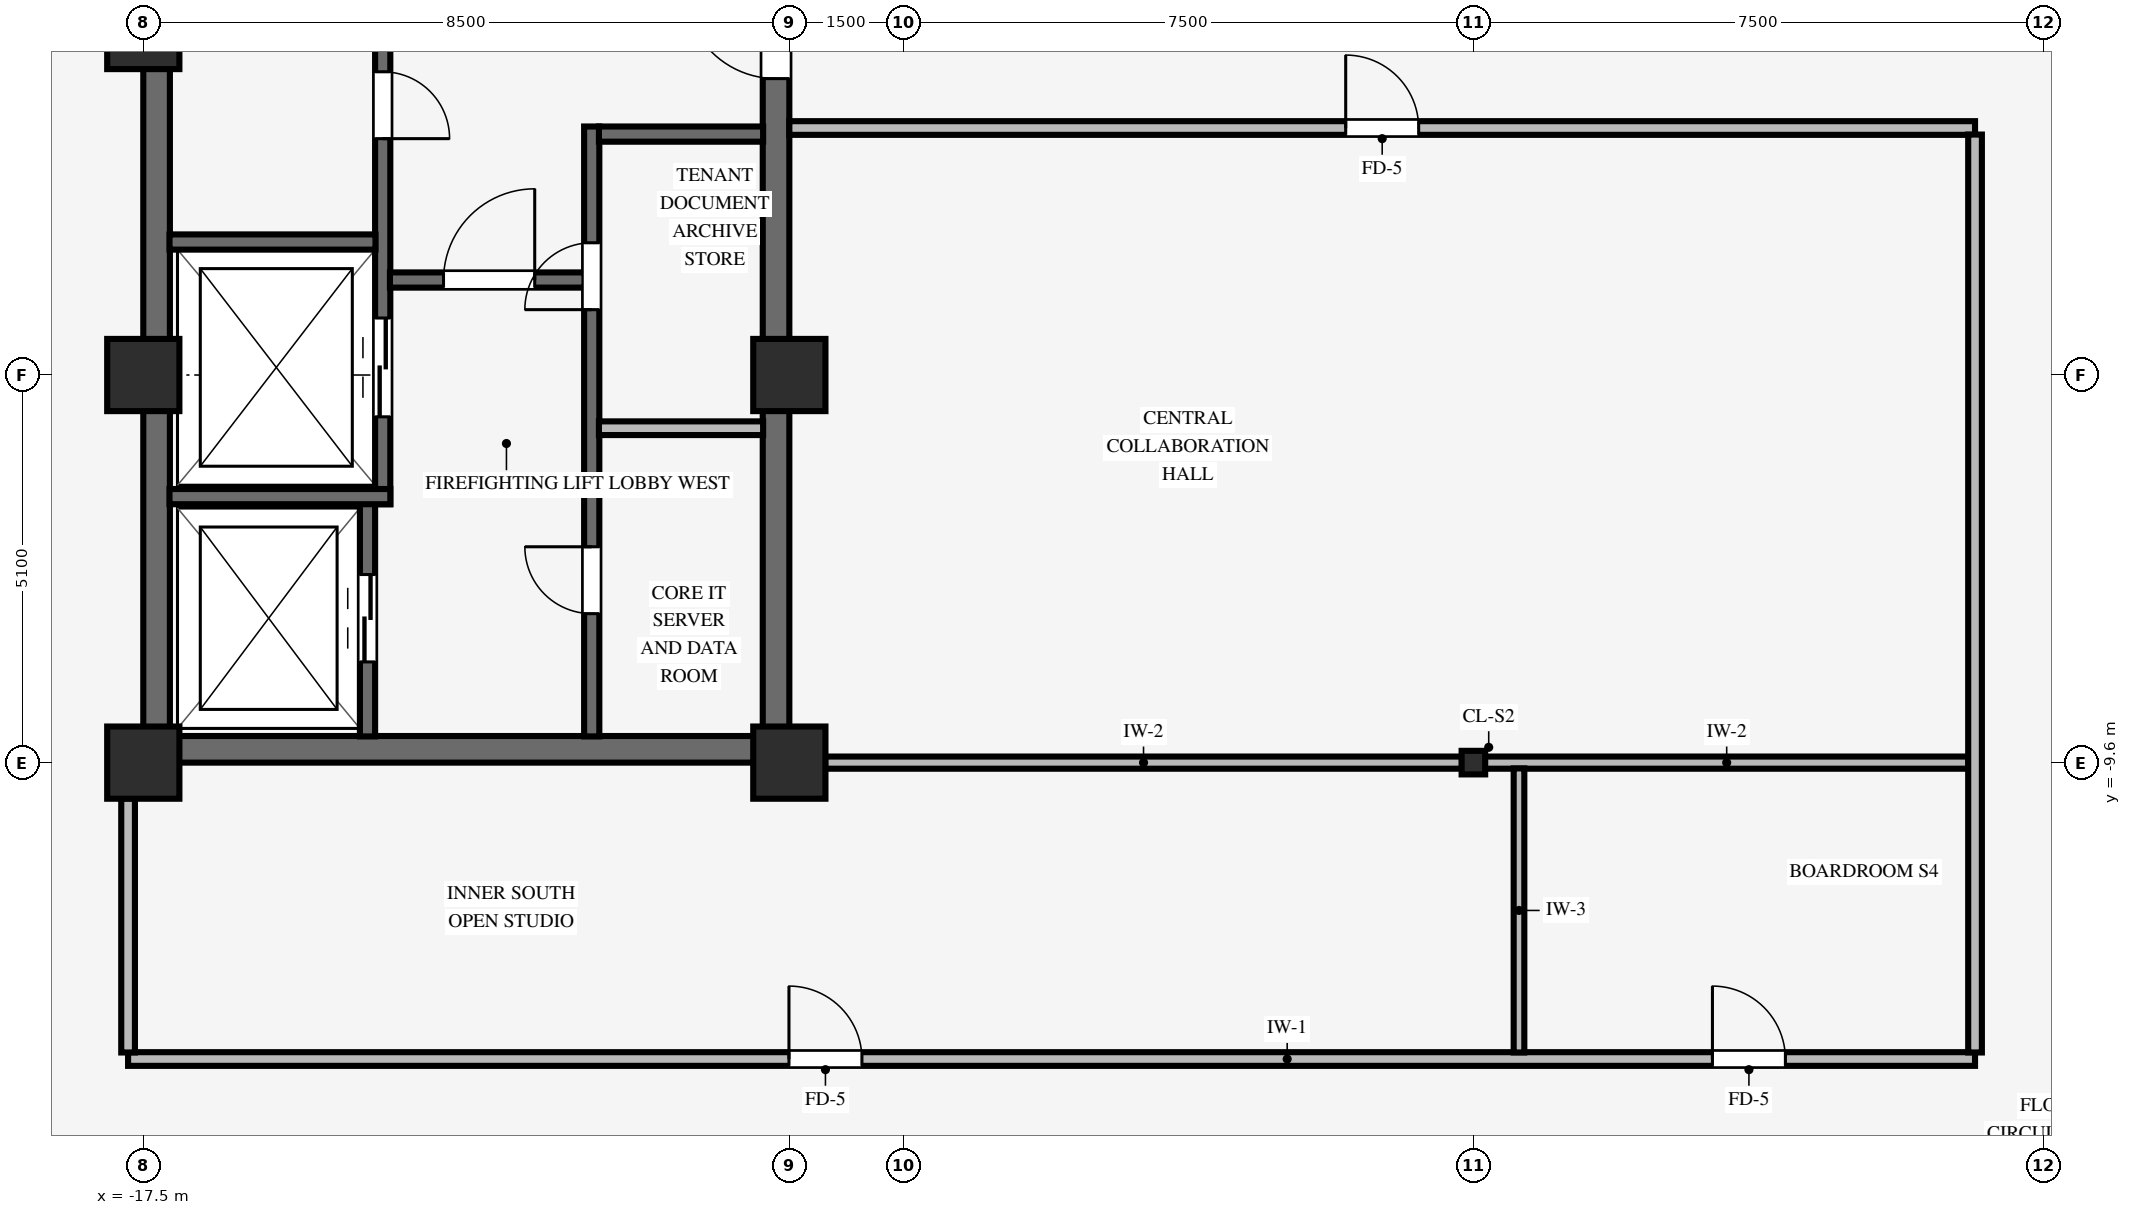
"""IFC4 building model, lengths in metres.
Left out: names, types, materials, properties, quantities, classifications, styles, units other than length and angle.
Written with IfcOpenShell. Run it as: python <this file> out.ifc"""

import sys

from ifc_helpers import new_model, si_unit, direction, frame, frame_2d, origin, origin_2d, place, context, subcontext, project, spatial, rectangle, i_section, extrude, source, transform, mapped, element, fill, save


model = new_model("IFC4")
c1 = context("Model", 3, precision=1e-05, world=origin(), true_north=direction((0.0, 1.0)))
c2 = subcontext(c1, "Body", "Model", "MODEL_VIEW")
j1 = project(units=[si_unit("LENGTHUNIT", "METRE"), si_unit("PLANEANGLEUNIT", "RADIAN")], contexts=[c1])
p1 = place(None, origin())
s1 = spatial("IfcSite", under=j1, at=p1, CompositionType="ELEMENT")
p2 = place(p1, origin())
s2 = spatial("IfcBuilding", under=s1, at=p2, CompositionType="ELEMENT")
p3 = place(p2, frame((0.0, 0.0, 209.15)))
s3 = spatial("IfcBuildingStorey", under=s2, at=p3, CompositionType="ELEMENT", Elevation=209.15)
p4 = place(p3, frame((-17.5, -9.425, 0.0), z_axis=(0.0, 0.0, 1.0), x_axis=(1.0, 0.0, 0.0)))
e1 = element("IfcWall", 1, at=p4, inside=s3, PredefinedType="SHEAR", context=c2, shape_type="SweptSolid", body=[
    extrude(rectangle(XDim=8.5, YDim=0.35, at=frame_2d((4.25, 0.0))), origin(), (0.0, 0.0, 1.0), 3.37),
])
p5 = place(p3, frame((-17.325, -9.255, 0.0), z_axis=(0.0, 0.0, 1.0), x_axis=(0.0, 1.0, 0.0)))
e2 = element("IfcWall", 2, at=p5, inside=s3, PredefinedType="SHEAR", context=c2, shape_type="SweptSolid", body=[
    extrude(rectangle(XDim=18.51, YDim=0.35, at=frame_2d((9.255, 0.0))), origin(), (0.0, 0.0, 1.0), 3.37),
])
p6 = place(p3, frame((-9.175, -9.255, 0.0), z_axis=(0.0, 0.0, 1.0), x_axis=(0.0, 1.0, 0.0)))
e3 = element("IfcWall", 3, at=p6, inside=s3, PredefinedType="SHEAR", context=c2, shape_type="SweptSolid", body=[
    extrude(rectangle(XDim=18.51, YDim=0.35, at=frame_2d((9.255, 0.0))), origin(), (0.0, 0.0, 1.0), 3.37),
])
p7 = place(p6, frame((8.655, 0.0, 0.0)))
e4 = element("IfcOpeningElement", 4, at=p7, cuts=e3, PredefinedType="OPENING", context=c2, shape_type="SweptSolid", body=[
    extrude(rectangle(XDim=1.2, YDim=2.15, at=frame_2d((0.6, 1.075))), frame((0.0, 0.185, 0.0), z_axis=(0.0, -1.0, 0.0), x_axis=(1.0, 0.0, 0.0)), (0.0, 0.0, 1.0), 0.37),
])
for number, where, z_axis, x_axis in (
    (5, (-17.5, -9.6, 0.0), (0.0, 0.0, 1.0), (1.0, 0.0, 0.0)),
    (6, (-17.5, -4.5, 0.0), (0.0, 0.0, 1.0), (1.0, 0.0, 0.0)),
    (7, (-9.0, -9.6, 0.0), (0.0, 0.0, 1.0), (1.0, 0.0, 0.0)),
    (8, (-9.0, -4.5, 0.0), (0.0, 0.0, 1.0), (1.0, 0.0, 0.0)),
    (9, (-17.5, 0.0, 0.0), (0.0, 0.0, 1.0), (1.0, 0.0, 0.0)),
):
    element("IfcColumn", number, at=place(p3, frame(where, z_axis=z_axis, x_axis=x_axis)), inside=s3, PredefinedType="COLUMN", context=c2, shape_type="SweptSolid", body=[
        extrude(rectangle(XDim=0.95, YDim=0.95, at=origin_2d()), origin(), (0.0, 0.0, 1.0), 3.37),
    ])
p8 = place(p3, frame((0.0, -9.6, 0.0), z_axis=(0.0, 0.0, 1.0), x_axis=(1.0, 0.0, 0.0)))
e10 = element("IfcColumn", 10, at=p8, inside=s3, PredefinedType="COLUMN", context=c2, shape_type="SweptSolid", body=[
    extrude(i_section(OverallWidth=0.31, OverallDepth=0.31, WebThickness=0.015, FlangeThickness=0.015, FilletRadius=0.015, at=origin_2d()), origin(), (0.0, 0.0, 1.0), 3.37),
])
p9 = place(p3, frame((-14.55, -9.255, 0.0), z_axis=(0.0, 0.0, 1.0), x_axis=(0.0, 1.0, 0.0)))
e11 = element("IfcWall", 11, at=p9, inside=s3, PredefinedType="SHEAR", context=c2, shape_type="SweptSolid", body=[
    extrude(rectangle(XDim=3.06, YDim=0.2, at=frame_2d((1.53, 0.0))), origin(), (0.0, 0.0, 1.0), 3.37),
])
p10 = place(p9, frame((0.98, 0.0, 0.0)))
e12 = element("IfcOpeningElement", 12, at=p10, cuts=e11, PredefinedType="OPENING", context=c2, shape_type="SweptSolid", body=[
    extrude(rectangle(XDim=1.15, YDim=2.15, at=frame_2d((0.575, 1.075))), frame((0.0, 0.11, 0.0), z_axis=(0.0, -1.0, 0.0), x_axis=(1.0, 0.0, 0.0)), (0.0, 0.0, 1.0), 0.22),
])
p11 = place(p3, frame((-14.35, -6.2, 0.0), z_axis=(0.0, 0.0, 1.0), x_axis=(0.0, 1.0, 0.0)))
e13 = element("IfcWall", 13, at=p11, inside=s3, PredefinedType="SHEAR", context=c2, shape_type="SweptSolid", body=[
    extrude(rectangle(XDim=7.105, YDim=0.2, at=frame_2d((3.552, 0.0))), origin(), (0.0, 0.0, 1.0), 3.37),
])
p12 = place(p11, frame((5.69, 0.0, 0.0), z_axis=(0.0, 0.0, 1.0), x_axis=(-1.0, 0.0, 0.0)))
e14 = element("IfcOpeningElement", 14, at=p12, cuts=e13, PredefinedType="OPENING", context=c2, shape_type="SweptSolid", body=[
    extrude(rectangle(XDim=0.88, YDim=2.1, at=frame_2d((0.44, 1.05))), frame((0.0, 0.11, 0.0), z_axis=(0.0, -1.0, 0.0), x_axis=(1.0, 0.0, 0.0)), (0.0, 0.0, 1.0), 0.22),
])
p13 = place(p11, frame((1.15, 0.0, 0.0)))
e15 = element("IfcOpeningElement", 15, at=p13, cuts=e13, PredefinedType="OPENING", context=c2, shape_type="SweptSolid", body=[
    extrude(rectangle(XDim=1.3, YDim=2.2, at=frame_2d((0.65, 1.1))), frame((0.0, 0.11, 0.0), z_axis=(0.0, -1.0, 0.0), x_axis=(1.0, 0.0, 0.0)), (0.0, 0.0, 1.0), 0.22),
])
p14 = place(p3, frame((-17.155, -6.1, 0.0), z_axis=(0.0, 0.0, 1.0), x_axis=(1.0, 0.0, 0.0)))
e16 = element("IfcWall", 16, at=p14, inside=s3, PredefinedType="SHEAR", context=c2, shape_type="SweptSolid", body=[
    extrude(rectangle(XDim=2.905, YDim=0.2, at=frame_2d((1.453, 0.0))), origin(), (0.0, 0.0, 1.0), 3.37),
])
p15 = place(p3, frame((-17.155, -2.75, 0.0), z_axis=(0.0, 0.0, 1.0), x_axis=(1.0, 0.0, 0.0)))
e17 = element("IfcWall", 17, at=p15, inside=s3, PredefinedType="SHEAR", context=c2, shape_type="SweptSolid", body=[
    extrude(rectangle(XDim=2.71, YDim=0.2, at=frame_2d((1.355, 0.0))), origin(), (0.0, 0.0, 1.0), 3.37),
])
p16 = place(p3, frame((-11.6, -9.255, 0.0), z_axis=(0.0, 0.0, 1.0), x_axis=(0.0, 1.0, 0.0)))
e18 = element("IfcWall", 18, at=p16, inside=s3, PredefinedType="SHEAR", context=c2, shape_type="SweptSolid", body=[
    extrude(rectangle(XDim=8.025, YDim=0.2, at=frame_2d((4.012, 0.0))), origin(), (0.0, 0.0, 1.0), 3.37),
])
p17 = place(p16, frame((1.615, 0.0, 0.0)))
e19 = element("IfcOpeningElement", 19, at=p17, cuts=e18, PredefinedType="OPENING", context=c2, shape_type="SweptSolid", body=[
    extrude(rectangle(XDim=0.88, YDim=2.1, at=frame_2d((0.44, 1.05))), frame((0.0, 0.11, 0.0), z_axis=(0.0, -1.0, 0.0), x_axis=(1.0, 0.0, 0.0)), (0.0, 0.0, 1.0), 0.22),
])
p18 = place(p16, frame((5.615, 0.0, 0.0)))
e20 = element("IfcOpeningElement", 20, at=p18, cuts=e18, PredefinedType="OPENING", context=c2, shape_type="SweptSolid", body=[
    extrude(rectangle(XDim=0.88, YDim=2.1, at=frame_2d((0.44, 1.05))), frame((0.0, 0.11, 0.0), z_axis=(0.0, -1.0, 0.0), x_axis=(1.0, 0.0, 0.0)), (0.0, 0.0, 1.0), 0.22),
])
p19 = place(p3, frame((-14.255, -3.25, 0.0), z_axis=(0.0, 0.0, 1.0), x_axis=(1.0, 0.0, 0.0)))
e21 = element("IfcWall", 21, at=p19, inside=s3, PredefinedType="SHEAR", context=c2, shape_type="SweptSolid", body=[
    extrude(rectangle(XDim=2.56, YDim=0.2, at=frame_2d((1.28, 0.0))), origin(), (0.0, 0.0, 1.0), 3.37),
])
p20 = place(p19, frame((0.705, 0.0, 0.0)))
e22 = element("IfcOpeningElement", 22, at=p20, cuts=e21, PredefinedType="OPENING", context=c2, shape_type="SweptSolid", body=[
    extrude(rectangle(XDim=1.2, YDim=2.15, at=frame_2d((0.6, 1.075))), frame((0.0, 0.11, 0.0), z_axis=(0.0, -1.0, 0.0), x_axis=(1.0, 0.0, 0.0)), (0.0, 0.0, 1.0), 0.22),
])
p21 = place(p3, frame((-11.505, -1.33, 0.0), z_axis=(0.0, 0.0, 1.0), x_axis=(1.0, 0.0, 0.0)))
e23 = element("IfcWall", 23, at=p21, inside=s3, PredefinedType="SHEAR", context=c2, shape_type="SweptSolid", body=[
    extrude(rectangle(XDim=2.16, YDim=0.2, at=frame_2d((1.08, 0.0))), origin(), (0.0, 0.0, 1.0), 3.37),
])
p22 = place(p3, frame((-11.505, -5.2, 0.0), z_axis=(0.0, 0.0, 1.0), x_axis=(1.0, 0.0, 0.0)))
e24 = element("IfcWall", 24, at=p22, inside=s3, PredefinedType="PARTITIONING", context=c2, shape_type="SweptSolid", body=[
    extrude(rectangle(XDim=2.16, YDim=0.18, at=frame_2d((1.08, 0.0))), origin(), (0.0, 0.0, 1.0), 3.36),
])
p23 = place(p3, frame((-17.7, -13.5, 0.0), z_axis=(0.0, 0.0, 1.0), x_axis=(1.0, 0.0, 0.0)))
e25 = element("IfcWall", 25, at=p23, inside=s3, PredefinedType="PARTITIONING", context=c2, shape_type="SweptSolid", body=[
    extrude(rectangle(XDim=24.3, YDim=0.18, at=frame_2d((12.15, 0.0))), origin(), (0.0, 0.0, 1.0), 3.008),
])
p24 = place(p23, frame((8.695, 0.0, 0.0)))
e26 = element("IfcOpeningElement", 26, at=p24, cuts=e25, PredefinedType="OPENING", context=c2, shape_type="SweptSolid", body=[
    extrude(rectangle(XDim=0.96, YDim=2.1, at=frame_2d((0.48, 1.05))), frame((0.0, 0.1, 0.0), z_axis=(0.0, -1.0, 0.0), x_axis=(1.0, 0.0, 0.0)), (0.0, 0.0, 1.0), 0.2),
])
p25 = place(p23, frame((20.845, 0.0, 0.0)))
e27 = element("IfcOpeningElement", 27, at=p25, cuts=e25, PredefinedType="OPENING", context=c2, shape_type="SweptSolid", body=[
    extrude(rectangle(XDim=0.96, YDim=2.1, at=frame_2d((0.48, 1.05))), frame((0.0, 0.1, 0.0), z_axis=(0.0, -1.0, 0.0), x_axis=(1.0, 0.0, 0.0)), (0.0, 0.0, 1.0), 0.2),
])
p26 = place(p3, frame((-8.529, -9.6, 0.0), z_axis=(0.0, 0.0, 1.0), x_axis=(1.0, 0.0, 0.0)))
e28 = element("IfcWall", 28, at=p26, inside=s3, PredefinedType="PARTITIONING", context=c2, shape_type="SweptSolid", body=[
    extrude(rectangle(XDim=8.378, YDim=0.16, at=frame_2d((4.189, 0.0))), origin(), (0.0, 0.0, 1.0), 2.405),
])
p27 = place(p3, frame((0.151, -9.6, 0.0), z_axis=(0.0, 0.0, 1.0), x_axis=(1.0, 0.0, 0.0)))
e29 = element("IfcWall", 29, at=p27, inside=s3, PredefinedType="PARTITIONING", context=c2, shape_type="SweptSolid", body=[
    extrude(rectangle(XDim=6.363, YDim=0.16, at=frame_2d((3.182, 0.0))), origin(), (0.0, 0.0, 1.0), 2.405),
])
p28 = place(p3, frame((-9.0, -1.25, 0.0), z_axis=(0.0, 0.0, 1.0), x_axis=(1.0, 0.0, 0.0)))
e30 = element("IfcWall", 30, at=p28, inside=s3, PredefinedType="PARTITIONING", context=c2, shape_type="SweptSolid", body=[
    extrude(rectangle(XDim=15.6, YDim=0.18, at=frame_2d((7.8, 0.0))), origin(), (0.0, 0.0, 1.0), 3.36),
])
p29 = place(p28, frame((7.32, 0.0, 0.0)))
e31 = element("IfcOpeningElement", 31, at=p29, cuts=e30, PredefinedType="OPENING", context=c2, shape_type="SweptSolid", body=[
    extrude(rectangle(XDim=0.96, YDim=2.1, at=frame_2d((0.48, 1.05))), frame((0.0, 0.1, 0.0), z_axis=(0.0, -1.0, 0.0), x_axis=(1.0, 0.0, 0.0)), (0.0, 0.0, 1.0), 0.2),
])
p30 = place(p3, frame((-17.7, -13.414, 0.0), z_axis=(0.0, 0.0, 1.0), x_axis=(0.0, 1.0, 0.0)))
e32 = element("IfcWall", 32, at=p30, inside=s3, PredefinedType="PARTITIONING", context=c2, shape_type="SweptSolid", body=[
    extrude(rectangle(XDim=3.343, YDim=0.18, at=frame_2d((1.671, 0.0))), origin(), (0.0, 0.0, 1.0), 2.816),
])
p31 = place(p3, frame((0.6, -13.414, 0.0), z_axis=(0.0, 0.0, 1.0), x_axis=(0.0, 1.0, 0.0)))
e33 = element("IfcWall", 33, at=p31, inside=s3, PredefinedType="PARTITIONING", context=c2, shape_type="SweptSolid", body=[
    extrude(rectangle(XDim=3.738, YDim=0.14, at=frame_2d((1.869, 0.0))), origin(), (0.0, 0.0, 1.0), 3.36),
])
p32 = place(p3, frame((6.6, -13.414, 0.0), z_axis=(0.0, 0.0, 1.0), x_axis=(0.0, 1.0, 0.0)))
e34 = element("IfcWall", 34, at=p32, inside=s3, PredefinedType="PARTITIONING", context=c2, shape_type="SweptSolid", body=[
    extrude(rectangle(XDim=12.078, YDim=0.18, at=frame_2d((6.039, 0.0))), origin(), (0.0, 0.0, 1.0), 3.36),
])
m1 = source(origin(), c2, "Body", "SweptSolid", [
    extrude(rectangle(XDim=0.88, YDim=2.1, at=frame_2d((0.44, 1.05))), frame((0.0, 0.025, 0.0), z_axis=(0.0, -1.0, 0.0), x_axis=(1.0, 0.0, 0.0)), (0.0, 0.0, 1.0), 0.05),
])
p33 = place(p12, origin())
e35 = element("IfcDoor", 35, at=p33, inside=s3, OperationType="SINGLE_SWING_RIGHT", PredefinedType="DOOR", context=c2, shape_type="MappedRepresentation", body=[
    mapped(m1, transform((0.0, 0.0, 0.0), scale=1.0)),
])
fill(e14, e35)
m2 = source(origin(), c2, "Body", "SweptSolid", [
    extrude(rectangle(XDim=1.2, YDim=2.15, at=frame_2d((0.6, 1.075))), frame((0.0, 0.025, 0.0), z_axis=(0.0, -1.0, 0.0), x_axis=(1.0, 0.0, 0.0)), (0.0, 0.0, 1.0), 0.05),
])
p34 = place(p20, origin())
e36 = element("IfcDoor", 36, at=p34, inside=s3, OperationType="SINGLE_SWING_RIGHT", PredefinedType="DOOR", context=c2, shape_type="MappedRepresentation", body=[
    mapped(m2, transform((0.0, 0.0, 0.0), scale=1.0)),
])
fill(e22, e36)
p35 = place(p17, origin())
e37 = element("IfcDoor", 37, at=p35, inside=s3, OperationType="SINGLE_SWING_RIGHT", PredefinedType="DOOR", context=c2, shape_type="MappedRepresentation", body=[
    mapped(m1, transform((0.0, 0.0, 0.0), scale=1.0)),
])
fill(e19, e37)
p36 = place(p18, origin())
e38 = element("IfcDoor", 38, at=p36, inside=s3, OperationType="SINGLE_SWING_LEFT", PredefinedType="DOOR", context=c2, shape_type="MappedRepresentation", body=[
    mapped(m1, transform((0.0, 0.0, 0.0), scale=1.0)),
])
fill(e20, e38)
p37 = place(p7, origin())
e39 = element("IfcDoor", 39, at=p37, inside=s3, OperationType="SINGLE_SWING_RIGHT", PredefinedType="DOOR", context=c2, shape_type="MappedRepresentation", body=[
    mapped(m2, transform((0.0, 0.0, 0.0), scale=1.0)),
])
fill(e4, e39)
m3 = source(origin(), c2, "Body", "SweptSolid", [
    extrude(rectangle(XDim=1.15, YDim=2.15, at=frame_2d((0.575, 1.075))), frame((0.0, 0.025, 0.0), z_axis=(0.0, -1.0, 0.0), x_axis=(1.0, 0.0, 0.0)), (0.0, 0.0, 1.0), 0.05),
])
p38 = place(p10, origin())
e40 = element("IfcDoor", 40, at=p38, inside=s3, OperationType="DOUBLE_DOOR_SLIDING", PredefinedType="DOOR", context=c2, shape_type="MappedRepresentation", body=[
    mapped(m3, transform((0.0, 0.0, 0.0), scale=1.0)),
])
fill(e12, e40)
m4 = source(origin(), c2, "Body", "SweptSolid", [
    extrude(rectangle(XDim=1.3, YDim=2.2, at=frame_2d((0.65, 1.1))), frame((0.0, 0.025, 0.0), z_axis=(0.0, -1.0, 0.0), x_axis=(1.0, 0.0, 0.0)), (0.0, 0.0, 1.0), 0.05),
])
p39 = place(p13, origin())
e41 = element("IfcDoor", 41, at=p39, inside=s3, OperationType="DOUBLE_DOOR_SLIDING", PredefinedType="DOOR", context=c2, shape_type="MappedRepresentation", body=[
    mapped(m4, transform((0.0, 0.0, 0.0), scale=1.0)),
])
fill(e15, e41)
m5 = source(origin(), c2, "Body", "SweptSolid", [
    extrude(rectangle(XDim=0.96, YDim=2.1, at=frame_2d((0.48, 1.05))), frame((0.0, 0.025, 0.0), z_axis=(0.0, -1.0, 0.0), x_axis=(1.0, 0.0, 0.0)), (0.0, 0.0, 1.0), 0.05),
])
p40 = place(p24, origin())
e42 = element("IfcDoor", 42, at=p40, inside=s3, OperationType="SINGLE_SWING_LEFT", PredefinedType="DOOR", context=c2, shape_type="MappedRepresentation", body=[
    mapped(m5, transform((0.0, 0.0, 0.0), scale=1.0)),
])
fill(e26, e42)
p41 = place(p29, origin())
e43 = element("IfcDoor", 43, at=p41, inside=s3, OperationType="SINGLE_SWING_LEFT", PredefinedType="DOOR", context=c2, shape_type="MappedRepresentation", body=[
    mapped(m5, transform((0.0, 0.0, 0.0), scale=1.0)),
])
fill(e31, e43)
p42 = place(p25, origin())
e44 = element("IfcDoor", 44, at=p42, inside=s3, OperationType="SINGLE_SWING_LEFT", PredefinedType="DOOR", context=c2, shape_type="MappedRepresentation", body=[
    mapped(m5, transform((0.0, 0.0, 0.0), scale=1.0)),
])
fill(e27, e44)
save(model, sys.argv[1])
